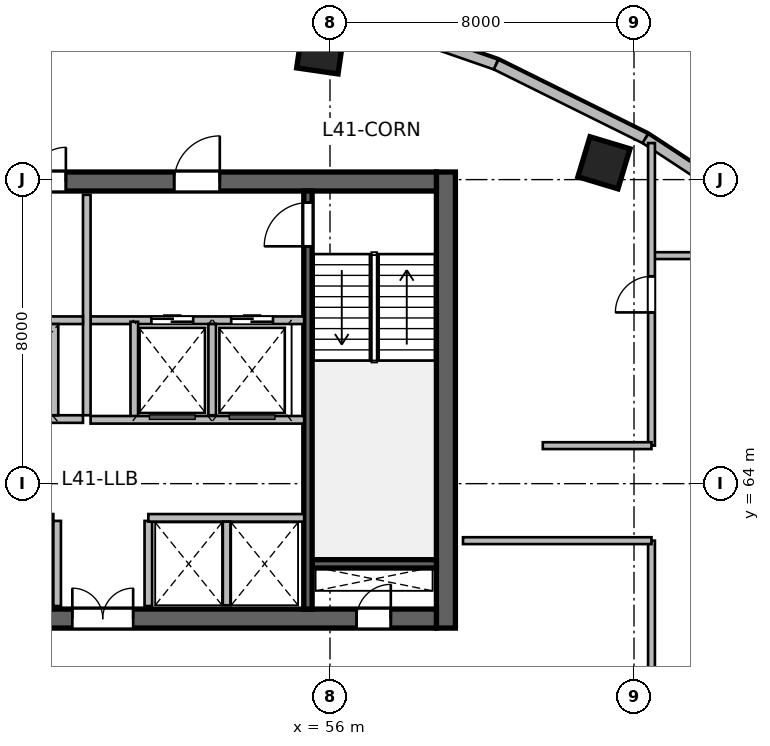
"""IFC4 building model, lengths in metres.
Left out: names, types, materials, properties, quantities, classifications, styles, units other than length and angle.
Written with IfcOpenShell. Run it as: python <this file> out.ifc"""

import sys

from ifc_helpers import new_model, si_unit, direction, frame, frame_2d, origin, origin_2d, place, context, subcontext, project, spatial, rectangle, extrude, source, transform, mapped, element, fill, save


model = new_model("IFC4")
c1 = context("Model", 3, precision=1e-05, world=origin(), true_north=direction((0.0, 1.0)))
c2 = subcontext(c1, "Body", "Model", "MODEL_VIEW")
j1 = project(units=[si_unit("LENGTHUNIT", "METRE"), si_unit("PLANEANGLEUNIT", "RADIAN")], contexts=[c1])
p1 = place(None, origin())
s1 = spatial("IfcSite", under=j1, at=p1, CompositionType="ELEMENT")
p2 = place(p1, origin())
s2 = spatial("IfcBuilding", under=s1, at=p2, CompositionType="ELEMENT")
p3 = place(p2, frame((0.0, 0.0, 170.1)))
s3 = spatial("IfcBuildingStorey", under=s2, at=p3, CompositionType="ELEMENT", Elevation=170.1)
m1 = source(origin(), c2, "Body", "SweptSolid", [
    extrude(rectangle(XDim=12.0, YDim=0.5, at=frame_2d((6.0, 0.0))), origin(), (0.0, 0.0, 1.0), 3.9),
])
p4 = place(p3, frame((59.05, 60.2, 0.0), z_axis=(0.0, 0.0, 1.0), x_axis=(0.0, 1.0, 0.0)))
e1 = element("IfcWall", 1, at=p4, inside=s3, PredefinedType="SHEAR", context=c2, shape_type="MappedRepresentation", body=[
    mapped(m1, transform((0.0, 0.0, 0.0), scale=1.0)),
])
m2 = source(origin(), c2, "Body", "SweptSolid", [
    extrude(rectangle(XDim=21.6, YDim=0.5, at=frame_2d((10.8, 0.0))), origin(), (0.0, 0.0, 1.0), 3.9),
])
p5 = place(p3, frame((37.2, 60.45, 0.0), z_axis=(0.0, 0.0, 1.0), x_axis=(1.0, 0.0, 0.0)))
e2 = element("IfcWall", 2, at=p5, inside=s3, PredefinedType="SHEAR", context=c2, shape_type="MappedRepresentation", body=[
    mapped(m2, transform((0.0, 0.0, 0.0), scale=1.0)),
])
p6 = place(p5, frame((1.1, 0.0, 0.0)))
e3 = element("IfcOpeningElement", 3, at=p6, cuts=e2, PredefinedType="OPENING", context=c2, shape_type="SweptSolid", body=[
    extrude(rectangle(XDim=1.15, YDim=2.15, at=frame_2d((0.575, 1.075))), frame((0.0, 0.26, 0.0), z_axis=(0.0, -1.0, 0.0), x_axis=(1.0, 0.0, 0.0)), (0.0, 0.0, 1.0), 0.52),
])
p7 = place(p5, frame((19.5, 0.0, 0.0)))
e4 = element("IfcOpeningElement", 4, at=p7, cuts=e2, PredefinedType="OPENING", context=c2, shape_type="SweptSolid", body=[
    extrude(rectangle(XDim=0.9, YDim=2.1, at=frame_2d((0.45, 1.05))), frame((0.0, 0.26, 0.0), z_axis=(0.0, -1.0, 0.0), x_axis=(1.0, 0.0, 0.0)), (0.0, 0.0, 1.0), 0.52),
])
p8 = place(p5, frame((12.02, 0.0, 0.0)))
e5 = element("IfcOpeningElement", 5, at=p8, cuts=e2, PredefinedType="OPENING", context=c2, shape_type="SweptSolid", body=[
    extrude(rectangle(XDim=1.6, YDim=2.15, at=frame_2d((0.8, 1.075))), frame((0.0, 0.26, 0.0), z_axis=(0.0, -1.0, 0.0), x_axis=(1.0, 0.0, 0.0)), (0.0, 0.0, 1.0), 0.52),
])
p9 = place(p3, frame((37.2, 71.95, 0.0), z_axis=(0.0, 0.0, 1.0), x_axis=(1.0, 0.0, 0.0)))
e6 = element("IfcWall", 6, at=p9, inside=s3, PredefinedType="SHEAR", context=c2, shape_type="MappedRepresentation", body=[
    mapped(m2, transform((0.0, 0.0, 0.0), scale=1.0)),
])
p10 = place(p9, frame((1.2, 0.0, 0.0)))
e7 = element("IfcOpeningElement", 7, at=p10, cuts=e6, PredefinedType="OPENING", context=c2, shape_type="SweptSolid", body=[
    extrude(rectangle(XDim=0.9, YDim=2.1, at=frame_2d((0.45, 1.05))), frame((0.0, 0.26, 0.0), z_axis=(0.0, -1.0, 0.0), x_axis=(1.0, 0.0, 0.0)), (0.0, 0.0, 1.0), 0.52),
])
p11 = place(p9, frame((14.7, 0.0, 0.0)))
e8 = element("IfcOpeningElement", 8, at=p11, cuts=e6, PredefinedType="OPENING", context=c2, shape_type="SweptSolid", body=[
    extrude(rectangle(XDim=1.2, YDim=2.15, at=frame_2d((0.6, 1.075))), frame((0.0, 0.26, 0.0), z_axis=(0.0, -1.0, 0.0), x_axis=(1.0, 0.0, 0.0)), (0.0, 0.0, 1.0), 0.52),
])
p12 = place(p9, frame((4.15, 0.0, 0.0)))
e9 = element("IfcOpeningElement", 9, at=p12, cuts=e6, PredefinedType="OPENING", context=c2, shape_type="SweptSolid", body=[
    extrude(rectangle(XDim=1.3, YDim=2.15, at=frame_2d((0.65, 1.075))), frame((0.0, 0.26, 0.0), z_axis=(0.0, -1.0, 0.0), x_axis=(1.0, 0.0, 0.0)), (0.0, 0.0, 1.0), 0.52),
])
p13 = place(p9, frame((7.25, 0.0, 0.0)))
e10 = element("IfcOpeningElement", 10, at=p13, cuts=e6, PredefinedType="OPENING", context=c2, shape_type="SweptSolid", body=[
    extrude(rectangle(XDim=0.9, YDim=2.1, at=frame_2d((0.45, 1.05))), frame((0.0, 0.26, 0.0), z_axis=(0.0, -1.0, 0.0), x_axis=(1.0, 0.0, 0.0)), (0.0, 0.0, 1.0), 0.52),
])
p14 = place(p9, frame((10.95, 0.0, 0.0)))
e11 = element("IfcOpeningElement", 11, at=p14, cuts=e6, PredefinedType="OPENING", context=c2, shape_type="SweptSolid", body=[
    extrude(rectangle(XDim=0.9, YDim=2.1, at=frame_2d((0.45, 1.05))), frame((0.0, 0.26, 0.0), z_axis=(0.0, -1.0, 0.0), x_axis=(1.0, 0.0, 0.0)), (0.0, 0.0, 1.0), 0.52),
])
m3 = source(origin(), c2, "Body", "SweptSolid", [
    extrude(rectangle(XDim=3.27, YDim=0.22, at=frame_2d((1.635, 0.0))), origin(), (0.0, 0.0, 1.0), 3.9),
])
p15 = place(p3, frame((55.53, 61.89, 0.0), z_axis=(0.0, 0.0, 1.0), x_axis=(1.0, 0.0, 0.0)))
e12 = element("IfcWall", 12, at=p15, inside=s3, PredefinedType="SHEAR", context=c2, shape_type="MappedRepresentation", body=[
    mapped(m3, transform((0.0, 0.0, 0.0), scale=1.0)),
])
m4 = source(origin(), c2, "Body", "SweptSolid", [
    extrude(rectangle(XDim=11.0, YDim=0.22, at=frame_2d((5.5, 0.0))), origin(), (0.0, 0.0, 1.0), 3.9),
])
p16 = place(p3, frame((55.42, 60.7, 0.0), z_axis=(0.0, 0.0, 1.0), x_axis=(0.0, 1.0, 0.0)))
e13 = element("IfcWall", 13, at=p16, inside=s3, PredefinedType="SHEAR", context=c2, shape_type="MappedRepresentation", body=[
    mapped(m4, transform((0.0, 0.0, 0.0), scale=1.0)),
])
p17 = place(p16, frame((9.545, 0.0, 0.0)))
e14 = element("IfcOpeningElement", 14, at=p17, cuts=e13, PredefinedType="OPENING", context=c2, shape_type="SweptSolid", body=[
    extrude(rectangle(XDim=1.15, YDim=2.15, at=frame_2d((0.575, 1.075))), frame((0.0, 0.12, 0.0), z_axis=(0.0, -1.0, 0.0), x_axis=(1.0, 0.0, 0.0)), (0.0, 0.0, 1.0), 0.24),
])
m5 = source(origin(), c2, "Body", "SweptSolid", [
    extrude(rectangle(XDim=1.1, YDim=1.1, at=origin_2d()), origin(), (0.0, 0.0, 1.0), 3.9),
])
for number, where, z_axis, x_axis in (
    (15, (55.747, 75.404, 0.0), (0.0, 0.0, 1.0), (0.143, 0.99, 0.0)),
    (16, (63.209, 72.442, 0.0), (0.0, 0.0, 1.0), (0.289, 0.957, 0.0)),
):
    element("IfcColumn", number, at=place(p3, frame(where, z_axis=z_axis, x_axis=x_axis)), inside=s3, PredefinedType="COLUMN", context=c2, shape_type="MappedRepresentation", body=[
        mapped(m5, transform((0.0, 0.0, 0.0), scale=1.0)),
    ])
m6 = source(origin(), c2, "Body", "SweptSolid", [
    extrude(rectangle(XDim=4.29, YDim=0.28, at=frame_2d((2.145, 0.0))), origin(), (0.0, 0.0, 1.0), 3.65),
])
p18 = place(p3, frame((56.317, 76.431, 0.0), z_axis=(0.0, 0.0, 1.0), x_axis=(0.944883859218, -0.3274057003, 0.0)))
e17 = element("IfcWall", 17, at=p18, inside=s3, PredefinedType="SOLIDWALL", context=c2, shape_type="MappedRepresentation", body=[
    mapped(m6, transform((0.0, 0.0, 0.0), scale=1.0)),
])
m7 = source(origin(), c2, "Body", "SweptSolid", [
    extrude(rectangle(XDim=4.384, YDim=0.28, at=frame_2d((2.192, 0.0))), origin(), (0.0, 0.0, 1.0), 3.65),
])
p19 = place(p3, frame((60.37, 75.027, 0.0), z_axis=(0.0, 0.0, 1.0), x_axis=(0.895969968053, -0.444114643248, 0.0)))
e18 = element("IfcWall", 18, at=p19, inside=s3, PredefinedType="SOLIDWALL", context=c2, shape_type="MappedRepresentation", body=[
    mapped(m7, transform((0.0, 0.0, 0.0), scale=1.0)),
])
m8 = source(origin(), c2, "Body", "SweptSolid", [
    extrude(rectangle(XDim=4.501, YDim=0.28, at=frame_2d((2.25, 0.0))), origin(), (0.0, 0.0, 1.0), 3.65),
])
p20 = place(p3, frame((64.298, 73.08, 0.0), z_axis=(0.0, 0.0, 1.0), x_axis=(0.835984920737, -0.548752414391, 0.0)))
e19 = element("IfcWall", 19, at=p20, inside=s3, PredefinedType="SOLIDWALL", context=c2, shape_type="MappedRepresentation", body=[
    mapped(m8, transform((0.0, 0.0, 0.0), scale=1.0)),
])
m9 = source(origin(), c2, "Body", "SweptSolid", [
    extrude(rectangle(XDim=2.24, YDim=0.2, at=frame_2d((1.12, 0.0))), origin(), (0.0, 0.0, 1.0), 3.65),
])
for number, where, z_axis, x_axis in (
    (20, (48.82, 60.78, 0.0), (0.0, 0.0, 1.0), (0.0, 1.0, 0.0)),
    (21, (51.22, 60.78, 0.0), (0.0, 0.0, 1.0), (0.0, 1.0, 0.0)),
):
    element("IfcWall", number, at=place(p3, frame(where, z_axis=z_axis, x_axis=x_axis)), inside=s3, PredefinedType="SOLIDWALL", context=c2, shape_type="MappedRepresentation", body=[
        mapped(m9, transform((0.0, 0.0, 0.0), scale=1.0)),
    ])
m10 = source(origin(), c2, "Body", "SweptSolid", [
    extrude(rectangle(XDim=5.62, YDim=0.2, at=frame_2d((2.81, 0.0))), origin(), (0.0, 0.0, 1.0), 3.65),
])
p21 = place(p3, frame((49.7, 68.3, 0.0), z_axis=(0.0, 0.0, 1.0), x_axis=(1.0, 0.0, 0.0)))
e22 = element("IfcWall", 22, at=p21, inside=s3, PredefinedType="SOLIDWALL", context=c2, shape_type="MappedRepresentation", body=[
    mapped(m10, transform((0.0, 0.0, 0.0), scale=1.0)),
])
p22 = place(p21, frame((1.6, 0.0, 0.0)))
e23 = element("IfcOpeningElement", 23, at=p22, cuts=e22, PredefinedType="OPENING", context=c2, shape_type="SweptSolid", body=[
    extrude(rectangle(XDim=1.1, YDim=2.15, at=frame_2d((0.55, 1.075))), frame((0.0, 0.11, 0.0), z_axis=(0.0, -1.0, 0.0), x_axis=(1.0, 0.0, 0.0)), (0.0, 0.0, 1.0), 0.22),
])
p23 = place(p21, frame((3.7, 0.0, 0.0)))
e24 = element("IfcOpeningElement", 24, at=p23, cuts=e22, PredefinedType="OPENING", context=c2, shape_type="SweptSolid", body=[
    extrude(rectangle(XDim=1.1, YDim=2.15, at=frame_2d((0.55, 1.075))), frame((0.0, 0.11, 0.0), z_axis=(0.0, -1.0, 0.0), x_axis=(1.0, 0.0, 0.0)), (0.0, 0.0, 1.0), 0.22),
])
m11 = source(origin(), c2, "Body", "SweptSolid", [
    extrude(rectangle(XDim=5.8, YDim=0.2, at=frame_2d((2.9, 0.0))), origin(), (0.0, 0.0, 1.0), 3.65),
])
p24 = place(p3, frame((49.6, 65.8, 0.0), z_axis=(0.0, 0.0, 1.0), x_axis=(0.0, 1.0, 0.0)))
e25 = element("IfcWall", 25, at=p24, inside=s3, PredefinedType="SOLIDWALL", context=c2, shape_type="MappedRepresentation", body=[
    mapped(m11, transform((0.0, 0.0, 0.0), scale=1.0)),
])
m12 = source(origin(), c2, "Body", "SweptSolid", [
    extrude(rectangle(XDim=2.58, YDim=0.2, at=frame_2d((1.29, 0.0))), origin(), (0.0, 0.0, 1.0), 3.65),
])
p25 = place(p3, frame((50.85, 65.68, 0.0), z_axis=(0.0, 0.0, 1.0), x_axis=(0.0, 1.0, 0.0)))
e26 = element("IfcWall", 26, at=p25, inside=s3, PredefinedType="SOLIDWALL", context=c2, shape_type="MappedRepresentation", body=[
    mapped(m12, transform((0.0, 0.0, 0.0), scale=1.0)),
])
m13 = source(origin(), c2, "Body", "SweptSolid", [
    extrude(rectangle(XDim=2.4, YDim=0.2, at=frame_2d((1.2, 0.0))), origin(), (0.0, 0.0, 1.0), 3.65),
])
p26 = place(p3, frame((52.9, 65.8, 0.0), z_axis=(0.0, 0.0, 1.0), x_axis=(0.0, 1.0, 0.0)))
e27 = element("IfcWall", 27, at=p26, inside=s3, PredefinedType="SOLIDWALL", context=c2, shape_type="MappedRepresentation", body=[
    mapped(m13, transform((0.0, 0.0, 0.0), scale=1.0)),
])
p27 = place(p3, frame((49.7, 65.68, 0.0), z_axis=(0.0, 0.0, 1.0), x_axis=(1.0, 0.0, 0.0)))
e28 = element("IfcWall", 28, at=p27, inside=s3, PredefinedType="SOLIDWALL", context=c2, shape_type="MappedRepresentation", body=[
    mapped(m10, transform((0.0, 0.0, 0.0), scale=1.0)),
])
m14 = source(origin(), c2, "Body", "SweptSolid", [
    extrude(rectangle(XDim=8.8, YDim=0.2, at=frame_2d((4.4, 0.0))), origin(), (0.0, 0.0, 1.0), 3.65),
])
p28 = place(p3, frame((40.7, 68.3, 0.0), z_axis=(0.0, 0.0, 1.0), x_axis=(1.0, 0.0, 0.0)))
e29 = element("IfcWall", 29, at=p28, inside=s3, PredefinedType="SOLIDWALL", context=c2, shape_type="MappedRepresentation", body=[
    mapped(m14, transform((0.0, 0.0, 0.0), scale=1.0)),
])
m15 = source(origin(), c2, "Body", "SweptSolid", [
    extrude(rectangle(XDim=8.02, YDim=0.2, at=frame_2d((4.01, 0.0))), origin(), (0.0, 0.0, 1.0), 3.65),
])
p29 = place(p3, frame((40.7, 63.1, 0.0), z_axis=(0.0, 0.0, 1.0), x_axis=(1.0, 0.0, 0.0)))
e30 = element("IfcWall", 30, at=p29, inside=s3, PredefinedType="SOLIDWALL", context=c2, shape_type="MappedRepresentation", body=[
    mapped(m15, transform((0.0, 0.0, 0.0), scale=1.0)),
])
p30 = place(p29, frame((1.05, 0.0, 0.0)))
e31 = element("IfcOpeningElement", 31, at=p30, cuts=e30, PredefinedType="OPENING", context=c2, shape_type="SweptSolid", body=[
    extrude(rectangle(XDim=0.9, YDim=2.1, at=frame_2d((0.45, 1.05))), frame((0.0, 0.11, 0.0), z_axis=(0.0, -1.0, 0.0), x_axis=(1.0, 0.0, 0.0)), (0.0, 0.0, 1.0), 0.22),
])
p31 = place(p29, frame((4.99, 0.0, 0.0)))
e32 = element("IfcOpeningElement", 32, at=p31, cuts=e30, PredefinedType="OPENING", context=c2, shape_type="SweptSolid", body=[
    extrude(rectangle(XDim=0.9, YDim=2.1, at=frame_2d((0.45, 1.05))), frame((0.0, 0.11, 0.0), z_axis=(0.0, -1.0, 0.0), x_axis=(1.0, 0.0, 0.0)), (0.0, 0.0, 1.0), 0.22),
])
m16 = source(origin(), c2, "Body", "SweptSolid", [
    extrude(rectangle(XDim=4.1, YDim=0.2, at=frame_2d((2.05, 0.0))), origin(), (0.0, 0.0, 1.0), 3.65),
])
p32 = place(p3, frame((51.22, 63.1, 0.0), z_axis=(0.0, 0.0, 1.0), x_axis=(1.0, 0.0, 0.0)))
e33 = element("IfcWall", 33, at=p32, inside=s3, PredefinedType="SOLIDWALL", context=c2, shape_type="MappedRepresentation", body=[
    mapped(m16, transform((0.0, 0.0, 0.0), scale=1.0)),
])
m17 = source(origin(), c2, "Body", "SweptSolid", [
    extrude(rectangle(XDim=2.2, YDim=0.2, at=frame_2d((1.1, 0.0))), origin(), (0.0, 0.0, 1.0), 3.65),
])
p33 = place(p3, frame((53.28, 60.8, 0.0), z_axis=(0.0, 0.0, 1.0), x_axis=(0.0, 1.0, 0.0)))
e34 = element("IfcWall", 34, at=p33, inside=s3, PredefinedType="SOLIDWALL", context=c2, shape_type="MappedRepresentation", body=[
    mapped(m17, transform((0.0, 0.0, 0.0), scale=1.0)),
])
p34 = place(p3, frame((40.7, 65.7, 0.0), z_axis=(0.0, 0.0, 1.0), x_axis=(1.0, 0.0, 0.0)))
e35 = element("IfcWall", 35, at=p34, inside=s3, PredefinedType="SOLIDWALL", context=c2, shape_type="MappedRepresentation", body=[
    mapped(m14, transform((0.0, 0.0, 0.0), scale=1.0)),
])
p35 = place(p34, frame((0.72, 0.0, 0.0)))
e36 = element("IfcOpeningElement", 36, at=p35, cuts=e35, PredefinedType="OPENING", context=c2, shape_type="SweptSolid", body=[
    extrude(rectangle(XDim=1.0, YDim=2.15, at=frame_2d((0.5, 1.075))), frame((0.0, 0.11, 0.0), z_axis=(0.0, -1.0, 0.0), x_axis=(1.0, 0.0, 0.0)), (0.0, 0.0, 1.0), 0.22),
])
p36 = place(p34, frame((2.62, 0.0, 0.0)))
e37 = element("IfcOpeningElement", 37, at=p36, cuts=e35, PredefinedType="OPENING", context=c2, shape_type="SweptSolid", body=[
    extrude(rectangle(XDim=1.0, YDim=2.15, at=frame_2d((0.5, 1.075))), frame((0.0, 0.11, 0.0), z_axis=(0.0, -1.0, 0.0), x_axis=(1.0, 0.0, 0.0)), (0.0, 0.0, 1.0), 0.22),
])
p37 = place(p34, frame((4.55, 0.0, 0.0)))
e38 = element("IfcOpeningElement", 38, at=p37, cuts=e35, PredefinedType="OPENING", context=c2, shape_type="SweptSolid", body=[
    extrude(rectangle(XDim=1.0, YDim=2.15, at=frame_2d((0.5, 1.075))), frame((0.0, 0.11, 0.0), z_axis=(0.0, -1.0, 0.0), x_axis=(1.0, 0.0, 0.0)), (0.0, 0.0, 1.0), 0.22),
])
p38 = place(p34, frame((6.55, 0.0, 0.0)))
e39 = element("IfcOpeningElement", 39, at=p38, cuts=e35, PredefinedType="OPENING", context=c2, shape_type="SweptSolid", body=[
    extrude(rectangle(XDim=1.0, YDim=2.15, at=frame_2d((0.5, 1.075))), frame((0.0, 0.11, 0.0), z_axis=(0.0, -1.0, 0.0), x_axis=(1.0, 0.0, 0.0)), (0.0, 0.0, 1.0), 0.22),
])
p39 = place(p3, frame((48.75, 65.8, 0.0), z_axis=(0.0, 0.0, 1.0), x_axis=(0.0, 1.0, 0.0)))
e40 = element("IfcWall", 40, at=p39, inside=s3, PredefinedType="SOLIDWALL", context=c2, shape_type="MappedRepresentation", body=[
    mapped(m13, transform((0.0, 0.0, 0.0), scale=1.0)),
])
m18 = source(origin(), c2, "Body", "SweptSolid", [
    extrude(rectangle(XDim=2.5, YDim=0.18, at=frame_2d((1.25, 0.0))), origin(), (0.0, 0.0, 1.0), 3.022),
])
p40 = place(p3, frame((64.5, 70.0, 0.0), z_axis=(0.0, 0.0, 1.0), x_axis=(1.0, 0.0, 0.0)))
e41 = element("IfcWall", 41, at=p40, inside=s3, PredefinedType="PLUMBINGWALL", context=c2, shape_type="MappedRepresentation", body=[
    mapped(m18, transform((0.0, 0.0, 0.0), scale=1.0)),
])
m19 = source(origin(), c2, "Body", "SweptSolid", [
    extrude(rectangle(XDim=16.106, YDim=0.18, at=frame_2d((8.053, 0.0))), origin(), (0.0, 0.0, 1.0), 2.942),
])
p41 = place(p3, frame((64.46, 46.394, 0.0), z_axis=(0.0, 0.0, 1.0), x_axis=(0.0, 1.0, 0.0)))
e42 = element("IfcWall", 42, at=p41, inside=s3, PredefinedType="PLUMBINGWALL", context=c2, shape_type="MappedRepresentation", body=[
    mapped(m19, transform((0.0, 0.0, 0.0), scale=1.0)),
])
p42 = place(p41, frame((7.578, 0.0, 0.0)))
e43 = element("IfcOpeningElement", 43, at=p42, cuts=e42, PredefinedType="OPENING", context=c2, shape_type="SweptSolid", body=[
    extrude(rectangle(XDim=0.95, YDim=2.1, at=frame_2d((0.475, 1.05))), frame((0.0, 0.1, 0.0), z_axis=(0.0, -1.0, 0.0), x_axis=(1.0, 0.0, 0.0)), (0.0, 0.0, 1.0), 0.2),
])
m20 = source(origin(), c2, "Body", "SweptSolid", [
    extrude(rectangle(XDim=4.96, YDim=0.18, at=frame_2d((2.48, 0.0))), origin(), (0.0, 0.0, 1.0), 3.65),
])
p43 = place(p3, frame((59.5, 62.5, 0.0), z_axis=(0.0, 0.0, 1.0), x_axis=(1.0, 0.0, 0.0)))
e44 = element("IfcWall", 44, at=p43, inside=s3, PredefinedType="PLUMBINGWALL", context=c2, shape_type="MappedRepresentation", body=[
    mapped(m20, transform((0.0, 0.0, 0.0), scale=1.0)),
])
m21 = source(origin(), c2, "Body", "SweptSolid", [
    extrude(rectangle(XDim=7.962, YDim=0.18, at=frame_2d((3.981, 0.0))), origin(), (0.0, 0.0, 1.0), 3.65),
])
p44 = place(p3, frame((64.46, 65.0, 0.0), z_axis=(0.0, 0.0, 1.0), x_axis=(0.0, 1.0, 0.0)))
e45 = element("IfcWall", 45, at=p44, inside=s3, PredefinedType="PLUMBINGWALL", context=c2, shape_type="MappedRepresentation", body=[
    mapped(m21, transform((0.0, 0.0, 0.0), scale=1.0)),
])
p45 = place(p44, frame((3.506, 0.0, 0.0)))
e46 = element("IfcOpeningElement", 46, at=p45, cuts=e45, PredefinedType="OPENING", context=c2, shape_type="SweptSolid", body=[
    extrude(rectangle(XDim=0.95, YDim=2.1, at=frame_2d((0.475, 1.05))), frame((0.0, 0.1, 0.0), z_axis=(0.0, -1.0, 0.0), x_axis=(1.0, 0.0, 0.0)), (0.0, 0.0, 1.0), 0.2),
])
m22 = source(origin(), c2, "Body", "SweptSolid", [
    extrude(rectangle(XDim=2.86, YDim=0.18, at=frame_2d((1.43, 0.0))), origin(), (0.0, 0.0, 1.0), 3.65),
])
p46 = place(p3, frame((61.6, 65.0, 0.0), z_axis=(0.0, 0.0, 1.0), x_axis=(1.0, 0.0, 0.0)))
e47 = element("IfcWall", 47, at=p46, inside=s3, PredefinedType="PLUMBINGWALL", context=c2, shape_type="MappedRepresentation", body=[
    mapped(m22, transform((0.0, 0.0, 0.0), scale=1.0)),
])
m23 = source(origin(), c2, "Body", "SweptSolid", [
    extrude(rectangle(XDim=0.9, YDim=2.1, at=frame_2d((0.45, 1.05))), frame((0.0, 0.025, 0.0), z_axis=(0.0, -1.0, 0.0), x_axis=(1.0, 0.0, 0.0)), (0.0, 0.0, 1.0), 0.05),
])
p47 = place(p7, origin())
e48 = element("IfcDoor", 48, at=p47, inside=s3, OperationType="SINGLE_SWING_RIGHT", PredefinedType="DOOR", context=c2, shape_type="MappedRepresentation", body=[
    mapped(m23, transform((0.0, 0.0, 0.0), scale=1.0)),
])
fill(e4, e48)
m24 = source(origin(), c2, "Body", "SweptSolid", [
    extrude(rectangle(XDim=1.15, YDim=2.15, at=frame_2d((0.575, 1.075))), frame((0.0, 0.025, 0.0), z_axis=(0.0, -1.0, 0.0), x_axis=(1.0, 0.0, 0.0)), (0.0, 0.0, 1.0), 0.05),
])
p48 = place(p17, origin())
e49 = element("IfcDoor", 49, at=p48, inside=s3, OperationType="SINGLE_SWING_LEFT", PredefinedType="DOOR", context=c2, shape_type="MappedRepresentation", body=[
    mapped(m24, transform((0.0, 0.0, 0.0), scale=1.0)),
])
fill(e14, e49)
m25 = source(origin(), c2, "Body", "SweptSolid", [
    extrude(rectangle(XDim=1.6, YDim=2.15, at=frame_2d((0.8, 1.075))), frame((0.0, 0.025, 0.0), z_axis=(0.0, -1.0, 0.0), x_axis=(1.0, 0.0, 0.0)), (0.0, 0.0, 1.0), 0.05),
])
p49 = place(p8, origin())
e50 = element("IfcDoor", 50, at=p49, inside=s3, OperationType="DOUBLE_DOOR_SINGLE_SWING", PredefinedType="DOOR", context=c2, shape_type="MappedRepresentation", body=[
    mapped(m25, transform((0.0, 0.0, 0.0), scale=1.0)),
])
fill(e5, e50)
m26 = source(origin(), c2, "Body", "SweptSolid", [
    extrude(rectangle(XDim=1.2, YDim=2.15, at=frame_2d((0.6, 1.075))), frame((0.0, 0.025, 0.0), z_axis=(0.0, -1.0, 0.0), x_axis=(1.0, 0.0, 0.0)), (0.0, 0.0, 1.0), 0.05),
])
p50 = place(p11, origin())
e51 = element("IfcDoor", 51, at=p50, inside=s3, OperationType="SINGLE_SWING_RIGHT", PredefinedType="DOOR", context=c2, shape_type="MappedRepresentation", body=[
    mapped(m26, transform((0.0, 0.0, 0.0), scale=1.0)),
])
fill(e8, e51)
m27 = source(origin(), c2, "Body", "SweptSolid", [
    extrude(rectangle(XDim=1.1, YDim=2.15, at=frame_2d((0.55, 1.075))), frame((0.0, 0.025, 0.0), z_axis=(0.0, -1.0, 0.0), x_axis=(1.0, 0.0, 0.0)), (0.0, 0.0, 1.0), 0.05),
])
p51 = place(p22, origin())
e52 = element("IfcDoor", 52, at=p51, inside=s3, OperationType="DOUBLE_DOOR_SLIDING", PredefinedType="DOOR", context=c2, shape_type="MappedRepresentation", body=[
    mapped(m27, transform((0.0, 0.0, 0.0), scale=1.0)),
])
fill(e23, e52)
p52 = place(p23, origin())
e53 = element("IfcDoor", 53, at=p52, inside=s3, OperationType="DOUBLE_DOOR_SLIDING", PredefinedType="DOOR", context=c2, shape_type="MappedRepresentation", body=[
    mapped(m27, transform((0.0, 0.0, 0.0), scale=1.0)),
])
fill(e24, e53)
p53 = place(p14, origin())
e54 = element("IfcDoor", 54, at=p53, inside=s3, OperationType="SINGLE_SWING_RIGHT", PredefinedType="DOOR", context=c2, shape_type="MappedRepresentation", body=[
    mapped(m23, transform((0.0, 0.0, 0.0), scale=1.0)),
])
fill(e11, e54)
m28 = source(origin(), c2, "Body", "SweptSolid", [
    extrude(rectangle(XDim=0.95, YDim=2.1, at=frame_2d((0.475, 1.05))), frame((0.0, 0.025, 0.0), z_axis=(0.0, -1.0, 0.0), x_axis=(1.0, 0.0, 0.0)), (0.0, 0.0, 1.0), 0.05),
])
p54 = place(p45, origin())
e55 = element("IfcDoor", 55, at=p54, inside=s3, OperationType="SINGLE_SWING_LEFT", PredefinedType="DOOR", context=c2, shape_type="MappedRepresentation", body=[
    mapped(m28, transform((0.0, 0.0, 0.0), scale=1.0)),
])
fill(e46, e55)
save(model, sys.argv[1])
